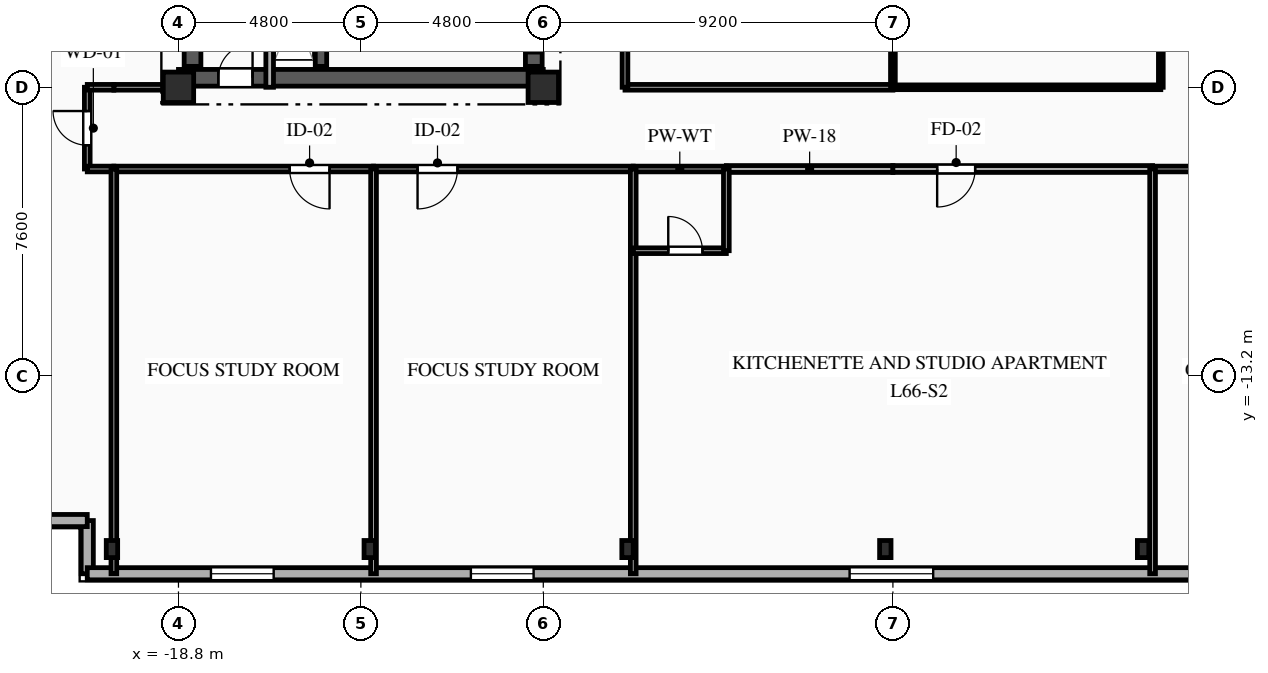
"""IFC4 building model, lengths in metres.
Left out: names, types, materials, properties, quantities, classifications, styles, units other than length and angle.
Written with IfcOpenShell. Run it as: python <this file> out.ifc"""

import sys

from ifc_helpers import new_model, si_unit, direction, frame, frame_2d, origin, origin_2d, place, context, subcontext, project, spatial, rectangle, i_section, extrude, element, fill, save


model = new_model("IFC4")
c1 = context("Model", 3, precision=1e-05, world=origin(), true_north=direction((0.0, 1.0)))
c2 = subcontext(c1, "Body", "Model", "MODEL_VIEW")
j1 = project(units=[si_unit("LENGTHUNIT", "METRE"), si_unit("PLANEANGLEUNIT", "RADIAN")], contexts=[c1])
p1 = place(None, origin())
s1 = spatial("IfcSite", under=j1, at=p1, CompositionType="ELEMENT")
p2 = place(p1, origin())
s2 = spatial("IfcBuilding", under=s1, at=p2, CompositionType="ELEMENT")
p3 = place(p2, frame((0.0, 0.0, 235.0)))
s3 = spatial("IfcBuildingStorey", under=s2, at=p3, CompositionType="ELEMENT", Elevation=235.0)
for number, where, z_axis, x_axis in (
    (1, (-18.8, -5.6, 0.0), (0.0, 0.0, 1.0), (1.0, 0.0, 0.0)),
    (2, (-9.2, -5.6, 0.0), (0.0, 0.0, 1.0), (1.0, 0.0, 0.0)),
):
    element("IfcColumn", number, at=place(p3, frame(where, z_axis=z_axis, x_axis=x_axis)), inside=s3, PredefinedType="COLUMN", context=c2, shape_type="SweptSolid", body=[
        extrude(rectangle(XDim=0.8, YDim=0.8, at=origin_2d()), origin(), (0.0, 0.0, 1.0), 3.35),
    ])
for number, where, z_axis, x_axis in (
    (3, (-20.55, -17.75, 0.0), (0.0, 0.0, 1.0), (1.0, 0.0, 0.0)),
    (4, (-13.767, -17.75, 0.0), (0.0, 0.0, 1.0), (1.0, 0.0, 0.0)),
    (5, (-6.983, -17.75, 0.0), (0.0, 0.0, 1.0), (1.0, 0.0, 0.0)),
    (6, (-0.2, -17.75, 0.0), (0.0, 0.0, 1.0), (1.0, 0.0, 0.0)),
    (7, (6.583, -17.75, 0.0), (0.0, 0.0, 1.0), (1.0, 0.0, 0.0)),
):
    element("IfcColumn", number, at=place(p3, frame(where, z_axis=z_axis, x_axis=x_axis)), inside=s3, PredefinedType="COLUMN", context=c2, shape_type="SweptSolid", body=[
        extrude(i_section(OverallWidth=0.3, OverallDepth=0.45, WebThickness=0.014, FlangeThickness=0.026, FilletRadius=0.027, at=origin_2d()), origin(), (0.0, 0.0, 1.0), 3.35),
    ])
p4 = place(p3, frame((-21.2, -18.4, 0.0), z_axis=(0.0, 0.0, 1.0), x_axis=(0.0, 1.0, 0.0)))
e8 = element("IfcWall", 8, at=p4, inside=s3, PredefinedType="SOLIDWALL", context=c2, shape_type="SweptSolid", body=[
    extrude(rectangle(XDim=1.4, YDim=0.32, at=frame_2d((0.7, 0.0))), origin(), (0.0, 0.0, 1.0), 3.04),
])
p5 = place(p3, frame((-21.2, -17.0, 0.0), z_axis=(0.0, 0.0, 1.0), x_axis=(-1.0, 0.0, 0.0)))
e9 = element("IfcWall", 9, at=p5, inside=s3, PredefinedType="SOLIDWALL", context=c2, shape_type="SweptSolid", body=[
    extrude(rectangle(XDim=1.4, YDim=0.32, at=frame_2d((0.7, 0.0))), origin(), (0.0, 0.0, 1.0), 3.04),
])
p6 = place(p3, frame((20.8, -18.4, 0.0), z_axis=(0.0, 0.0, 1.0), x_axis=(-1.0, 0.0, 0.0)))
e10 = element("IfcWall", 10, at=p6, inside=s3, PredefinedType="SOLIDWALL", context=c2, shape_type="SweptSolid", body=[
    extrude(rectangle(XDim=42.0, YDim=0.32, at=frame_2d((21.0, 0.0))), origin(), (0.0, 0.0, 1.0), 3.04),
])
p7 = place(p6, frame((3.015, 0.0, 0.85)))
e11 = element("IfcOpeningElement", 11, at=p7, cuts=e10, PredefinedType="OPENING", context=c2, shape_type="SweptSolid", body=[
    extrude(rectangle(XDim=1.65, YDim=1.85, at=frame_2d((0.825, 0.925))), frame((0.0, 0.17, 0.0), z_axis=(0.0, -1.0, 0.0), x_axis=(1.0, 0.0, 0.0)), (0.0, 0.0, 1.0), 0.34),
])
p8 = place(p6, frame((9.775, 0.0, 0.85)))
e12 = element("IfcOpeningElement", 12, at=p8, cuts=e10, PredefinedType="OPENING", context=c2, shape_type="SweptSolid", body=[
    extrude(rectangle(XDim=1.65, YDim=1.85, at=frame_2d((0.825, 0.925))), frame((0.0, 0.17, 0.0), z_axis=(0.0, -1.0, 0.0), x_axis=(1.0, 0.0, 0.0)), (0.0, 0.0, 1.0), 0.34),
])
p9 = place(p6, frame((19.74, 0.0, 0.85)))
e13 = element("IfcOpeningElement", 13, at=p9, cuts=e10, PredefinedType="OPENING", context=c2, shape_type="SweptSolid", body=[
    extrude(rectangle(XDim=2.2, YDim=1.85, at=frame_2d((1.1, 0.925))), frame((0.0, 0.17, 0.0), z_axis=(0.0, -1.0, 0.0), x_axis=(1.0, 0.0, 0.0)), (0.0, 0.0, 1.0), 0.34),
])
p10 = place(p6, frame((30.255, 0.0, 0.85)))
e14 = element("IfcOpeningElement", 14, at=p10, cuts=e10, PredefinedType="OPENING", context=c2, shape_type="SweptSolid", body=[
    extrude(rectangle(XDim=1.65, YDim=1.85, at=frame_2d((0.825, 0.925))), frame((0.0, 0.17, 0.0), z_axis=(0.0, -1.0, 0.0), x_axis=(1.0, 0.0, 0.0)), (0.0, 0.0, 1.0), 0.34),
])
p11 = place(p6, frame((37.095, 0.0, 0.85)))
e15 = element("IfcOpeningElement", 15, at=p11, cuts=e10, PredefinedType="OPENING", context=c2, shape_type="SweptSolid", body=[
    extrude(rectangle(XDim=1.65, YDim=1.85, at=frame_2d((0.825, 0.925))), frame((0.0, 0.17, 0.0), z_axis=(0.0, -1.0, 0.0), x_axis=(1.0, 0.0, 0.0)), (0.0, 0.0, 1.0), 0.34),
])
p12 = place(p3, frame((-18.8, -5.35, 0.0), z_axis=(0.0, 0.0, 1.0), x_axis=(1.0, 0.0, 0.0)))
e16 = element("IfcWall", 16, at=p12, inside=s3, PredefinedType="SHEAR", context=c2, shape_type="SweptSolid", body=[
    extrude(rectangle(XDim=9.6, YDim=0.44, at=frame_2d((4.8, 0.0))), origin(), (0.0, 0.0, 1.0), 3.04),
])
p13 = place(p12, frame((1.05, 0.0, 0.0)))
e17 = element("IfcOpeningElement", 17, at=p13, cuts=e16, PredefinedType="OPENING", context=c2, shape_type="SweptSolid", body=[
    extrude(rectangle(XDim=0.9, YDim=2.1, at=frame_2d((0.45, 1.05))), frame((0.0, 0.23, 0.0), z_axis=(0.0, -1.0, 0.0), x_axis=(1.0, 0.0, 0.0)), (0.0, 0.0, 1.0), 0.46),
])
p14 = place(p3, frame((-18.43, -5.05, 0.0), z_axis=(0.0, 0.0, 1.0), x_axis=(0.0, 1.0, 0.0)))
e18 = element("IfcWall", 18, at=p14, inside=s3, PredefinedType="SHEAR", context=c2, shape_type="SweptSolid", body=[
    extrude(rectangle(XDim=10.1, YDim=0.44, at=frame_2d((5.05, 0.0))), origin(), (0.0, 0.0, 1.0), 3.04),
])
p15 = place(p3, frame((-9.45, -5.05, 0.0), z_axis=(0.0, 0.0, 1.0), x_axis=(0.0, 1.0, 0.0)))
e19 = element("IfcWall", 19, at=p15, inside=s3, PredefinedType="SHEAR", context=c2, shape_type="SweptSolid", body=[
    extrude(rectangle(XDim=10.1, YDim=0.44, at=frame_2d((5.05, 0.0))), origin(), (0.0, 0.0, 1.0), 3.04),
])
p16 = place(p15, frame((7.15, 0.0, 0.0)))
e20 = element("IfcOpeningElement", 20, at=p16, cuts=e19, PredefinedType="OPENING", context=c2, shape_type="SweptSolid", body=[
    extrude(rectangle(XDim=0.9, YDim=2.1, at=frame_2d((0.45, 1.05))), frame((0.0, 0.23, 0.0), z_axis=(0.0, -1.0, 0.0), x_axis=(1.0, 0.0, 0.0)), (0.0, 0.0, 1.0), 0.46),
])
p17 = place(p15, frame((2.4, 0.0, 0.0)))
e21 = element("IfcOpeningElement", 21, at=p17, cuts=e19, PredefinedType="OPENING", context=c2, shape_type="SweptSolid", body=[
    extrude(rectangle(XDim=1.2, YDim=2.15, at=frame_2d((0.6, 1.075))), frame((0.0, 0.23, 0.0), z_axis=(0.0, -1.0, 0.0), x_axis=(1.0, 0.0, 0.0)), (0.0, 0.0, 1.0), 0.46),
])
p18 = place(p15, frame((0.35, 0.0, 0.0)))
e22 = element("IfcOpeningElement", 22, at=p18, cuts=e19, PredefinedType="OPENING", context=c2, shape_type="SweptSolid", body=[
    extrude(rectangle(XDim=0.9, YDim=2.1, at=frame_2d((0.45, 1.05))), frame((0.0, 0.23, 0.0), z_axis=(0.0, -1.0, 0.0), x_axis=(1.0, 0.0, 0.0)), (0.0, 0.0, 1.0), 0.46),
])
p19 = place(p15, frame((5.0, 0.0, 0.0)))
e23 = element("IfcOpeningElement", 23, at=p19, cuts=e19, PredefinedType="OPENING", context=c2, shape_type="SweptSolid", body=[
    extrude(rectangle(XDim=0.9, YDim=2.1, at=frame_2d((0.45, 1.05))), frame((0.0, 0.23, 0.0), z_axis=(0.0, -1.0, 0.0), x_axis=(1.0, 0.0, 0.0)), (0.0, 0.0, 1.0), 0.46),
])
p20 = place(p3, frame((-15.05, -5.05, 0.0), z_axis=(0.0, 0.0, 1.0), x_axis=(0.0, 1.0, 0.0)))
e24 = element("IfcWall", 24, at=p20, inside=s3, PredefinedType="SHEAR", context=c2, shape_type="SweptSolid", body=[
    extrude(rectangle(XDim=10.1, YDim=0.3, at=frame_2d((5.05, 0.0))), origin(), (0.0, 0.0, 1.0), 3.04),
])
p21 = place(p3, frame((-16.4, -5.6, 0.0), z_axis=(0.0, 0.0, 1.0), x_axis=(0.0, 1.0, 0.0)))
e25 = element("IfcWall", 25, at=p21, inside=s3, PredefinedType="PARTITIONING", context=c2, shape_type="SweptSolid", body=[
    extrude(rectangle(XDim=3.49, YDim=0.2, at=frame_2d((1.745, 0.0))), origin(), (0.0, 0.0, 1.0), 3.04),
])
p22 = place(p3, frame((-21.2, -7.75, 0.0), z_axis=(0.0, 0.0, 1.0), x_axis=(0.0, 1.0, 0.0)))
e26 = element("IfcWall", 26, at=p22, inside=s3, PredefinedType="PARTITIONING", context=c2, shape_type="SweptSolid", body=[
    extrude(rectangle(XDim=2.15, YDim=0.15, at=frame_2d((1.075, 0.0))), origin(), (0.0, 0.0, 1.0), 2.695),
])
p23 = place(p22, frame((0.625, 0.0, 0.0)))
e27 = element("IfcOpeningElement", 27, at=p23, cuts=e26, PredefinedType="OPENING", context=c2, shape_type="SweptSolid", body=[
    extrude(rectangle(XDim=0.9, YDim=2.1, at=frame_2d((0.45, 1.05))), frame((0.0, 0.085, 0.0), z_axis=(0.0, -1.0, 0.0), x_axis=(1.0, 0.0, 0.0)), (0.0, 0.0, 1.0), 0.17),
])
p24 = place(p3, frame((-20.5, -5.6, 0.0), z_axis=(0.0, 0.0, 1.0), x_axis=(1.0, 0.0, 0.0)))
e28 = element("IfcWall", 28, at=p24, inside=s3, PredefinedType="PARTITIONING", context=c2, shape_type="SweptSolid", body=[
    extrude(rectangle(XDim=1.7, YDim=0.15, at=frame_2d((0.85, 0.0))), origin(), (0.0, 0.0, 1.0), 3.04),
])
for number, where, z_axis, x_axis in (
    (29, (-20.5, -7.75, 0.0), (0.0, 0.0, 1.0), (-1.0, 0.0, 0.0)),
    (30, (-21.2, -5.6, 0.0), (0.0, 0.0, 1.0), (1.0, 0.0, 0.0)),
):
    element("IfcWall", number, at=place(p3, frame(where, z_axis=z_axis, x_axis=x_axis)), inside=s3, PredefinedType="PARTITIONING", context=c2, shape_type="SweptSolid", body=[
        extrude(rectangle(XDim=0.7, YDim=0.15, at=frame_2d((0.35, 0.0))), origin(), (0.0, 0.0, 1.0), 3.04),
    ])
p25 = place(p3, frame((-13.667, -7.75, 0.0), z_axis=(0.0, 0.0, 1.0), x_axis=(-1.0, 0.0, 0.0)))
e31 = element("IfcWall", 31, at=p25, inside=s3, PredefinedType="PARTITIONING", context=c2, shape_type="SweptSolid", body=[
    extrude(rectangle(XDim=6.833, YDim=0.15, at=frame_2d((3.417, 0.0))), origin(), (0.0, 0.0, 1.0), 3.04),
])
p26 = place(p25, frame((1.158, 0.0, 0.0)))
e32 = element("IfcOpeningElement", 32, at=p26, cuts=e31, PredefinedType="OPENING", context=c2, shape_type="SweptSolid", body=[
    extrude(rectangle(XDim=1.05, YDim=2.15, at=frame_2d((0.525, 1.075))), frame((0.0, 0.085, 0.0), z_axis=(0.0, -1.0, 0.0), x_axis=(1.0, 0.0, 0.0)), (0.0, 0.0, 1.0), 0.17),
])
p27 = place(p3, frame((-6.833, -7.75, 0.0), z_axis=(0.0, 0.0, 1.0), x_axis=(-1.0, 0.0, 0.0)))
e33 = element("IfcWall", 33, at=p27, inside=s3, PredefinedType="PARTITIONING", context=c2, shape_type="SweptSolid", body=[
    extrude(rectangle(XDim=6.833, YDim=0.15, at=frame_2d((3.417, 0.0))), origin(), (0.0, 0.0, 1.0), 3.04),
])
p28 = place(p27, frame((4.625, 0.0, 0.0)))
e34 = element("IfcOpeningElement", 34, at=p28, cuts=e33, PredefinedType="OPENING", context=c2, shape_type="SweptSolid", body=[
    extrude(rectangle(XDim=1.05, YDim=2.15, at=frame_2d((0.525, 1.075))), frame((0.0, 0.085, 0.0), z_axis=(0.0, -1.0, 0.0), x_axis=(1.0, 0.0, 0.0)), (0.0, 0.0, 1.0), 0.17),
])
p29 = place(p3, frame((0.0, -7.75, 0.0), z_axis=(0.0, 0.0, 1.0), x_axis=(-1.0, 0.0, 0.0)))
e35 = element("IfcWall", 35, at=p29, inside=s3, PredefinedType="PARTITIONING", context=c2, shape_type="SweptSolid", body=[
    extrude(rectangle(XDim=4.383, YDim=0.18, at=frame_2d((2.191, 0.0))), origin(), (0.0, 0.0, 1.0), 3.04),
])
p30 = place(p3, frame((-4.383, -7.75, 0.0), z_axis=(0.0, 0.0, 1.0), x_axis=(-1.0, 0.0, 0.0)))
e36 = element("IfcWall", 36, at=p30, inside=s3, PredefinedType="PLUMBINGWALL", context=c2, shape_type="SweptSolid", body=[
    extrude(rectangle(XDim=2.45, YDim=0.15, at=frame_2d((1.225, 0.0))), origin(), (0.0, 0.0, 1.0), 3.04),
])
p31 = place(p3, frame((-7.05, -5.6, 0.0), z_axis=(0.0, 0.0, 1.0), x_axis=(1.0, 0.0, 0.0)))
e37 = element("IfcWall", 37, at=p31, inside=s3, PredefinedType="PARTITIONING", context=c2, shape_type="SweptSolid", body=[
    extrude(rectangle(XDim=7.05, YDim=0.15, at=frame_2d((3.525, 0.0))), origin(), (0.0, 0.0, 1.0), 2.525),
])
p32 = place(p3, frame((6.833, -7.75, 0.0), z_axis=(0.0, 0.0, 1.0), x_axis=(-1.0, 0.0, 0.0)))
e38 = element("IfcWall", 38, at=p32, inside=s3, PredefinedType="PARTITIONING", context=c2, shape_type="SweptSolid", body=[
    extrude(rectangle(XDim=6.833, YDim=0.18, at=frame_2d((3.417, 0.0))), origin(), (0.0, 0.0, 1.0), 3.04),
])
p33 = place(p32, frame((4.669, 0.0, 0.0)))
e39 = element("IfcOpeningElement", 39, at=p33, cuts=e38, PredefinedType="OPENING", context=c2, shape_type="SweptSolid", body=[
    extrude(rectangle(XDim=1.0, YDim=2.15, at=frame_2d((0.5, 1.075))), frame((0.0, 0.1, 0.0), z_axis=(0.0, -1.0, 0.0), x_axis=(1.0, 0.0, 0.0)), (0.0, 0.0, 1.0), 0.2),
])
p34 = place(p3, frame((13.667, -7.75, 0.0), z_axis=(0.0, 0.0, 1.0), x_axis=(-1.0, 0.0, 0.0)))
e40 = element("IfcWall", 40, at=p34, inside=s3, PredefinedType="PARTITIONING", context=c2, shape_type="SweptSolid", body=[
    extrude(rectangle(XDim=6.833, YDim=0.15, at=frame_2d((3.417, 0.0))), origin(), (0.0, 0.0, 1.0), 3.04),
])
p35 = place(p34, frame((1.158, 0.0, 0.0)))
e41 = element("IfcOpeningElement", 41, at=p35, cuts=e40, PredefinedType="OPENING", context=c2, shape_type="SweptSolid", body=[
    extrude(rectangle(XDim=1.05, YDim=2.15, at=frame_2d((0.525, 1.075))), frame((0.0, 0.085, 0.0), z_axis=(0.0, -1.0, 0.0), x_axis=(1.0, 0.0, 0.0)), (0.0, 0.0, 1.0), 0.17),
])
p36 = place(p3, frame((0.0, -5.6, 0.0), z_axis=(0.0, 0.0, 1.0), x_axis=(1.0, 0.0, 0.0)))
e42 = element("IfcWall", 42, at=p36, inside=s3, PredefinedType="PARTITIONING", context=c2, shape_type="SweptSolid", body=[
    extrude(rectangle(XDim=7.05, YDim=0.125, at=frame_2d((3.525, 0.0))), origin(), (0.0, 0.0, 1.0), 2.525),
])
p37 = place(p3, frame((-7.05, 8.5, 0.0), z_axis=(0.0, 0.0, 1.0), x_axis=(0.0, -1.0, 0.0)))
e43 = element("IfcWall", 43, at=p37, inside=s3, PredefinedType="PARTITIONING", context=c2, shape_type="SweptSolid", body=[
    extrude(rectangle(XDim=14.1, YDim=0.15, at=frame_2d((7.05, 0.0))), origin(), (0.0, 0.0, 1.0), 3.04),
])
p38 = place(p37, frame((8.074, 0.0, 0.0)))
e44 = element("IfcOpeningElement", 44, at=p38, cuts=e43, PredefinedType="OPENING", context=c2, shape_type="SweptSolid", body=[
    extrude(rectangle(XDim=0.95, YDim=2.1, at=frame_2d((0.475, 1.05))), frame((0.0, 0.085, 0.0), z_axis=(0.0, -1.0, 0.0), x_axis=(1.0, 0.0, 0.0)), (0.0, 0.0, 1.0), 0.17),
])
p39 = place(p3, frame((7.05, -5.6, 0.0), z_axis=(0.0, 0.0, 1.0), x_axis=(0.0, 1.0, 0.0)))
e45 = element("IfcWall", 45, at=p39, inside=s3, PredefinedType="PARTITIONING", context=c2, shape_type="SweptSolid", body=[
    extrude(rectangle(XDim=14.1, YDim=0.125, at=frame_2d((7.05, 0.0))), origin(), (0.0, 0.0, 1.0), 3.04),
])
p40 = place(p39, frame((5.076, 0.0, 0.0)))
e46 = element("IfcOpeningElement", 46, at=p40, cuts=e45, PredefinedType="OPENING", context=c2, shape_type="SweptSolid", body=[
    extrude(rectangle(XDim=0.95, YDim=2.1, at=frame_2d((0.475, 1.05))), frame((0.0, 0.073, 0.0), z_axis=(0.0, -1.0, 0.0), x_axis=(1.0, 0.0, 0.0)), (0.0, 0.0, 1.0), 0.145),
])
p41 = place(p3, frame((-20.5, -7.75, 0.0), z_axis=(0.0, 0.0, 1.0), x_axis=(0.0, -1.0, 0.0)))
e47 = element("IfcWall", 47, at=p41, inside=s3, PredefinedType="PARTITIONING", context=c2, shape_type="SweptSolid", body=[
    extrude(rectangle(XDim=10.65, YDim=0.15, at=frame_2d((5.325, 0.0))), origin(), (0.0, 0.0, 1.0), 2.665),
])
p42 = place(p3, frame((-13.667, -7.75, 0.0), z_axis=(0.0, 0.0, 1.0), x_axis=(0.0, -1.0, 0.0)))
e48 = element("IfcWall", 48, at=p42, inside=s3, PredefinedType="PARTITIONING", context=c2, shape_type="SweptSolid", body=[
    extrude(rectangle(XDim=10.65, YDim=0.15, at=frame_2d((5.325, 0.0))), origin(), (0.0, 0.0, 1.0), 3.04),
])
p43 = place(p3, frame((-6.833, -9.9, 0.0), z_axis=(0.0, 0.0, 1.0), x_axis=(0.0, -1.0, 0.0)))
e49 = element("IfcWall", 49, at=p43, inside=s3, PredefinedType="PARTITIONING", context=c2, shape_type="SweptSolid", body=[
    extrude(rectangle(XDim=8.5, YDim=0.15, at=frame_2d((4.25, 0.0))), origin(), (0.0, 0.0, 1.0), 2.665),
])
p44 = place(p3, frame((-6.833, -7.75, 0.0), z_axis=(0.0, 0.0, 1.0), x_axis=(0.0, -1.0, 0.0)))
e50 = element("IfcWall", 50, at=p44, inside=s3, PredefinedType="PLUMBINGWALL", context=c2, shape_type="SweptSolid", body=[
    extrude(rectangle(XDim=2.15, YDim=0.15, at=frame_2d((1.075, 0.0))), origin(), (0.0, 0.0, 1.0), 3.04),
])
p45 = place(p3, frame((-6.833, -9.9, 0.0), z_axis=(0.0, 0.0, 1.0), x_axis=(1.0, 0.0, 0.0)))
e51 = element("IfcWall", 51, at=p45, inside=s3, PredefinedType="PLUMBINGWALL", context=c2, shape_type="SweptSolid", body=[
    extrude(rectangle(XDim=2.45, YDim=0.15, at=frame_2d((1.225, 0.0))), origin(), (0.0, 0.0, 1.0), 3.04),
])
p46 = place(p45, frame((0.921, 0.0, 0.0)))
e52 = element("IfcOpeningElement", 52, at=p46, cuts=e51, PredefinedType="OPENING", context=c2, shape_type="SweptSolid", body=[
    extrude(rectangle(XDim=0.9, YDim=2.1, at=frame_2d((0.45, 1.05))), frame((0.0, 0.085, 0.0), z_axis=(0.0, -1.0, 0.0), x_axis=(1.0, 0.0, 0.0)), (0.0, 0.0, 1.0), 0.17),
])
p47 = place(p3, frame((-4.383, -9.9, 0.0), z_axis=(0.0, 0.0, 1.0), x_axis=(0.0, 1.0, 0.0)))
e53 = element("IfcWall", 53, at=p47, inside=s3, PredefinedType="PLUMBINGWALL", context=c2, shape_type="SweptSolid", body=[
    extrude(rectangle(XDim=2.15, YDim=0.15, at=frame_2d((1.075, 0.0))), origin(), (0.0, 0.0, 1.0), 3.04),
])
p48 = place(p3, frame((6.833, -7.75, 0.0), z_axis=(0.0, 0.0, 1.0), x_axis=(0.0, -1.0, 0.0)))
e54 = element("IfcWall", 54, at=p48, inside=s3, PredefinedType="PARTITIONING", context=c2, shape_type="SweptSolid", body=[
    extrude(rectangle(XDim=10.65, YDim=0.15, at=frame_2d((5.325, 0.0))), origin(), (0.0, 0.0, 1.0), 2.665),
])
p49 = place(p3, frame((0.0, 8.5, 0.0), z_axis=(0.0, 0.0, 1.0), x_axis=(0.0, -1.0, 0.0)))
e55 = element("IfcWall", 55, at=p49, inside=s3, PredefinedType="PARTITIONING", context=c2, shape_type="SweptSolid", body=[
    extrude(rectangle(XDim=14.1, YDim=0.125, at=frame_2d((7.05, 0.0))), origin(), (0.0, 0.0, 1.0), 3.04),
])
p50 = place(p9, origin())
e56 = element("IfcWindow", 56, at=p50, inside=s3, PartitioningType="SINGLE_PANEL", PredefinedType="WINDOW", context=c2, shape_type="SweptSolid", body=[
    extrude(rectangle(XDim=2.2, YDim=1.85, at=frame_2d((1.1, 0.925))), frame((0.0, 0.03, 0.0), z_axis=(0.0, -1.0, 0.0), x_axis=(1.0, 0.0, 0.0)), (0.0, 0.0, 1.0), 0.06),
])
fill(e13, e56)
p51 = place(p10, origin())
e57 = element("IfcWindow", 57, at=p51, inside=s3, PartitioningType="SINGLE_PANEL", PredefinedType="WINDOW", context=c2, shape_type="SweptSolid", body=[
    extrude(rectangle(XDim=1.65, YDim=1.85, at=frame_2d((0.825, 0.925))), frame((0.0, 0.03, 0.0), z_axis=(0.0, -1.0, 0.0), x_axis=(1.0, 0.0, 0.0)), (0.0, 0.0, 1.0), 0.06),
])
fill(e14, e57)
p52 = place(p11, origin())
e58 = element("IfcWindow", 58, at=p52, inside=s3, PartitioningType="SINGLE_PANEL", PredefinedType="WINDOW", context=c2, shape_type="SweptSolid", body=[
    extrude(rectangle(XDim=1.65, YDim=1.85, at=frame_2d((0.825, 0.925))), frame((0.0, 0.03, 0.0), z_axis=(0.0, -1.0, 0.0), x_axis=(1.0, 0.0, 0.0)), (0.0, 0.0, 1.0), 0.06),
])
fill(e15, e58)
p53 = place(p13, origin())
e59 = element("IfcDoor", 59, at=p53, inside=s3, OperationType="SINGLE_SWING_RIGHT", PredefinedType="DOOR", context=c2, shape_type="SweptSolid", body=[
    extrude(rectangle(XDim=0.9, YDim=2.1, at=frame_2d((0.45, 1.05))), frame((0.0, 0.025, 0.0), z_axis=(0.0, -1.0, 0.0), x_axis=(1.0, 0.0, 0.0)), (0.0, 0.0, 1.0), 0.05),
])
fill(e17, e59)
p54 = place(p18, origin())
e60 = element("IfcDoor", 60, at=p54, inside=s3, OperationType="SINGLE_SWING_RIGHT", PredefinedType="DOOR", context=c2, shape_type="SweptSolid", body=[
    extrude(rectangle(XDim=0.9, YDim=2.1, at=frame_2d((0.45, 1.05))), frame((0.0, 0.025, 0.0), z_axis=(0.0, -1.0, 0.0), x_axis=(1.0, 0.0, 0.0)), (0.0, 0.0, 1.0), 0.05),
])
fill(e22, e60)
p55 = place(p23, origin())
e61 = element("IfcDoor", 61, at=p55, inside=s3, OperationType="SINGLE_SWING_RIGHT", PredefinedType="DOOR", context=c2, shape_type="SweptSolid", body=[
    extrude(rectangle(XDim=0.9, YDim=2.1, at=frame_2d((0.45, 1.05))), frame((0.0, 0.025, 0.0), z_axis=(0.0, -1.0, 0.0), x_axis=(1.0, 0.0, 0.0)), (0.0, 0.0, 1.0), 0.05),
])
fill(e27, e61)
p56 = place(p26, origin())
e62 = element("IfcDoor", 62, at=p56, inside=s3, OperationType="SINGLE_SWING_LEFT", PredefinedType="DOOR", context=c2, shape_type="SweptSolid", body=[
    extrude(rectangle(XDim=1.05, YDim=2.15, at=frame_2d((0.525, 1.075))), frame((0.0, 0.025, 0.0), z_axis=(0.0, -1.0, 0.0), x_axis=(1.0, 0.0, 0.0)), (0.0, 0.0, 1.0), 0.05),
])
fill(e32, e62)
p57 = place(p28, origin())
e63 = element("IfcDoor", 63, at=p57, inside=s3, OperationType="SINGLE_SWING_RIGHT", PredefinedType="DOOR", context=c2, shape_type="SweptSolid", body=[
    extrude(rectangle(XDim=1.05, YDim=2.15, at=frame_2d((0.525, 1.075))), frame((0.0, 0.025, 0.0), z_axis=(0.0, -1.0, 0.0), x_axis=(1.0, 0.0, 0.0)), (0.0, 0.0, 1.0), 0.05),
])
fill(e34, e63)
p58 = place(p33, origin())
e64 = element("IfcDoor", 64, at=p58, inside=s3, OperationType="SINGLE_SWING_RIGHT", PredefinedType="DOOR", context=c2, shape_type="SweptSolid", body=[
    extrude(rectangle(XDim=1.0, YDim=2.15, at=frame_2d((0.5, 1.075))), frame((0.0, 0.025, 0.0), z_axis=(0.0, -1.0, 0.0), x_axis=(1.0, 0.0, 0.0)), (0.0, 0.0, 1.0), 0.05),
])
fill(e39, e64)
p59 = place(p46, origin())
e65 = element("IfcDoor", 65, at=p59, inside=s3, OperationType="SINGLE_SWING_LEFT", PredefinedType="DOOR", context=c2, shape_type="SweptSolid", body=[
    extrude(rectangle(XDim=0.9, YDim=2.1, at=frame_2d((0.45, 1.05))), frame((0.0, 0.025, 0.0), z_axis=(0.0, -1.0, 0.0), x_axis=(1.0, 0.0, 0.0)), (0.0, 0.0, 1.0), 0.05),
])
fill(e52, e65)
save(model, sys.argv[1])
